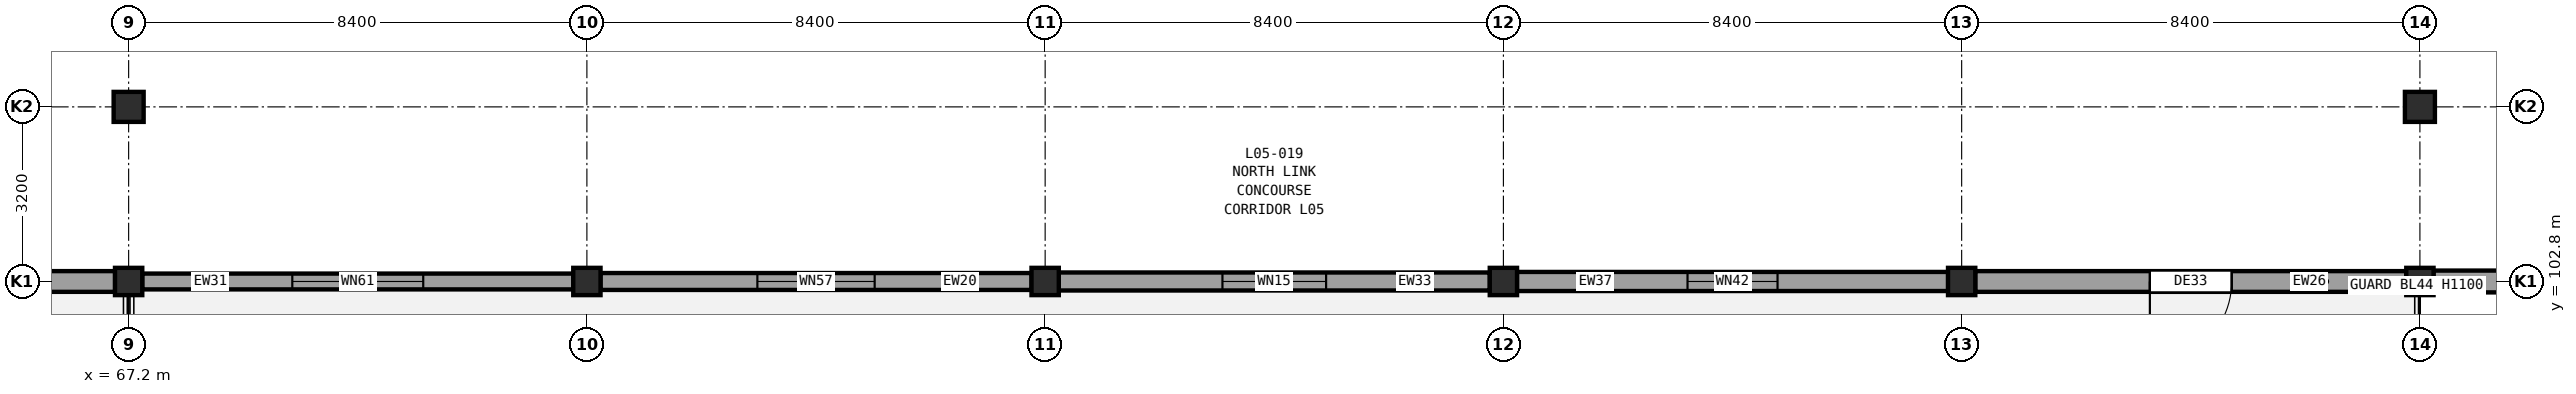
"""IFC4 building model, lengths in metres.
Left out: names, types, materials, properties, quantities, classifications, styles, units other than length and angle.
Written with IfcOpenShell. Run it as: python <this file> out.ifc"""

import sys

from ifc_helpers import new_model, si_unit, direction, frame, frame_2d, origin, origin_2d, place, context, subcontext, project, spatial, rectangle, extrude, element, fill, save


model = new_model("IFC4")
c1 = context("Model", 3, precision=1e-05, world=origin(), true_north=direction((0.0, 1.0)))
c2 = subcontext(c1, "Body", "Model", "MODEL_VIEW")
j1 = project(units=[si_unit("LENGTHUNIT", "METRE"), si_unit("PLANEANGLEUNIT", "RADIAN")], contexts=[c1])
p1 = place(None, origin())
s1 = spatial("IfcSite", under=j1, at=p1, CompositionType="ELEMENT")
p2 = place(p1, origin())
s2 = spatial("IfcBuilding", under=s1, at=p2, CompositionType="ELEMENT")
p3 = place(p2, frame((0.0, 0.0, 24.6)))
s3 = spatial("IfcBuildingStorey", under=s2, at=p3, CompositionType="ELEMENT", Elevation=24.6)
p4 = place(p3, frame((67.2, 102.8, 0.0), z_axis=(0.0, 0.0, 1.0), x_axis=(1.0, 0.0, 0.0)))
e1 = element("IfcColumn", 1, at=p4, inside=s3, PredefinedType="COLUMN", context=c2, shape_type="SweptSolid", body=[
    extrude(rectangle(XDim=0.5, YDim=0.5, at=origin_2d()), origin(), (0.0, 0.0, 1.0), 4.2),
])
p5 = place(p3, frame((67.2, 106.0, 0.0), z_axis=(0.0, 0.0, 1.0), x_axis=(1.0, 0.0, 0.0)))
e2 = element("IfcColumn", 2, at=p5, inside=s3, PredefinedType="COLUMN", context=c2, shape_type="SweptSolid", body=[
    extrude(rectangle(XDim=0.55, YDim=0.55, at=origin_2d()), origin(), (0.0, 0.0, 1.0), 4.2),
])
for number, where, z_axis, x_axis in (
    (3, (75.6, 102.8, 0.0), (0.0, 0.0, 1.0), (1.0, 0.0, 0.0)),
    (4, (84.0, 102.8, 0.0), (0.0, 0.0, 1.0), (1.0, 0.0, 0.0)),
    (5, (92.4, 102.8, 0.0), (0.0, 0.0, 1.0), (1.0, 0.0, 0.0)),
    (6, (100.8, 102.8, 0.0), (0.0, 0.0, 1.0), (1.0, 0.0, 0.0)),
    (7, (109.2, 102.8, 0.0), (0.0, 0.0, 1.0), (1.0, 0.0, 0.0)),
):
    element("IfcColumn", number, at=place(p3, frame(where, z_axis=z_axis, x_axis=x_axis)), inside=s3, PredefinedType="COLUMN", context=c2, shape_type="SweptSolid", body=[
        extrude(rectangle(XDim=0.5, YDim=0.5, at=origin_2d()), origin(), (0.0, 0.0, 1.0), 4.2),
    ])
p6 = place(p3, frame((109.2, 106.0, 0.0), z_axis=(0.0, 0.0, 1.0), x_axis=(1.0, 0.0, 0.0)))
e8 = element("IfcColumn", 8, at=p6, inside=s3, PredefinedType="COLUMN", context=c2, shape_type="SweptSolid", body=[
    extrude(rectangle(XDim=0.55, YDim=0.55, at=origin_2d()), origin(), (0.0, 0.0, 1.0), 4.2),
])
p7 = place(p3, frame((117.352, 102.8, 0.0), z_axis=(0.0, 0.0, 1.0), x_axis=(-1.0, 0.0, 0.0)))
e9 = element("IfcWall", 9, at=p7, inside=s3, PredefinedType="SOLIDWALL", context=c2, shape_type="SweptSolid", body=[
    extrude(rectangle(XDim=7.904, YDim=0.4, at=frame_2d((3.952, 0.0))), origin(), (0.0, 0.0, 1.0), 3.48),
])
p8 = place(p7, frame((2.019, 0.0, 0.9)))
e10 = element("IfcOpeningElement", 10, at=p8, cuts=e9, PredefinedType="OPENING", context=c2, shape_type="SweptSolid", body=[
    extrude(rectangle(XDim=1.4, YDim=2.15, at=frame_2d((0.7, 1.075))), frame((0.0, 0.21, 0.0), z_axis=(0.0, -1.0, 0.0), x_axis=(1.0, 0.0, 0.0)), (0.0, 0.0, 1.0), 0.42),
])
p9 = place(p3, frame((108.952, 102.8, 0.0), z_axis=(0.0, 0.0, 1.0), x_axis=(-1.0, 0.0, 0.0)))
e11 = element("IfcWall", 11, at=p9, inside=s3, PredefinedType="SOLIDWALL", context=c2, shape_type="SweptSolid", body=[
    extrude(rectangle(XDim=7.904, YDim=0.38, at=frame_2d((3.952, 0.0))), origin(), (0.0, 0.0, 1.0), 3.48),
])
p10 = place(p9, frame((3.202, 0.0, 0.0)))
e12 = element("IfcOpeningElement", 12, at=p10, cuts=e11, PredefinedType="OPENING", context=c2, shape_type="SweptSolid", body=[
    extrude(rectangle(XDim=1.5, YDim=2.2, at=frame_2d((0.75, 1.1))), frame((0.0, 0.2, 0.0), z_axis=(0.0, -1.0, 0.0), x_axis=(1.0, 0.0, 0.0)), (0.0, 0.0, 1.0), 0.4),
])
p11 = place(p3, frame((100.552, 102.8, 0.0), z_axis=(0.0, 0.0, 1.0), x_axis=(-1.0, 0.0, 0.0)))
e13 = element("IfcWall", 13, at=p11, inside=s3, PredefinedType="SOLIDWALL", context=c2, shape_type="SweptSolid", body=[
    extrude(rectangle(XDim=7.904, YDim=0.35, at=frame_2d((3.952, 0.0))), origin(), (0.0, 0.0, 1.0), 3.48),
])
p12 = place(p11, frame((3.127, 0.0, 0.9)))
e14 = element("IfcOpeningElement", 14, at=p12, cuts=e13, PredefinedType="OPENING", context=c2, shape_type="SweptSolid", body=[
    extrude(rectangle(XDim=1.65, YDim=2.15, at=frame_2d((0.825, 1.075))), frame((0.0, 0.185, 0.0), z_axis=(0.0, -1.0, 0.0), x_axis=(1.0, 0.0, 0.0)), (0.0, 0.0, 1.0), 0.37),
])
p13 = place(p3, frame((92.152, 102.8, 0.0), z_axis=(0.0, 0.0, 1.0), x_axis=(-1.0, 0.0, 0.0)))
e15 = element("IfcWall", 15, at=p13, inside=s3, PredefinedType="SOLIDWALL", context=c2, shape_type="SweptSolid", body=[
    extrude(rectangle(XDim=7.904, YDim=0.33, at=frame_2d((3.952, 0.0))), origin(), (0.0, 0.0, 1.0), 3.48),
])
p14 = place(p13, frame((3.002, 0.0, 0.9)))
e16 = element("IfcOpeningElement", 16, at=p14, cuts=e15, PredefinedType="OPENING", context=c2, shape_type="SweptSolid", body=[
    extrude(rectangle(XDim=1.9, YDim=2.15, at=frame_2d((0.95, 1.075))), frame((0.0, 0.175, 0.0), z_axis=(0.0, -1.0, 0.0), x_axis=(1.0, 0.0, 0.0)), (0.0, 0.0, 1.0), 0.35),
])
p15 = place(p3, frame((83.752, 102.8, 0.0), z_axis=(0.0, 0.0, 1.0), x_axis=(-1.0, 0.0, 0.0)))
e17 = element("IfcWall", 17, at=p15, inside=s3, PredefinedType="SOLIDWALL", context=c2, shape_type="SweptSolid", body=[
    extrude(rectangle(XDim=7.904, YDim=0.31, at=frame_2d((3.952, 0.0))), origin(), (0.0, 0.0, 1.0), 3.48),
])
p16 = place(p15, frame((2.877, 0.0, 0.9)))
e18 = element("IfcOpeningElement", 18, at=p16, cuts=e17, PredefinedType="OPENING", context=c2, shape_type="SweptSolid", body=[
    extrude(rectangle(XDim=2.15, YDim=2.15, at=frame_2d((1.075, 1.075))), frame((0.0, 0.165, 0.0), z_axis=(0.0, -1.0, 0.0), x_axis=(1.0, 0.0, 0.0)), (0.0, 0.0, 1.0), 0.33),
])
p17 = place(p3, frame((75.352, 102.8, 0.0), z_axis=(0.0, 0.0, 1.0), x_axis=(-1.0, 0.0, 0.0)))
e19 = element("IfcWall", 19, at=p17, inside=s3, PredefinedType="SOLIDWALL", context=c2, shape_type="SweptSolid", body=[
    extrude(rectangle(XDim=7.904, YDim=0.29, at=frame_2d((3.952, 0.0))), origin(), (0.0, 0.0, 1.0), 3.48),
])
p18 = place(p17, frame((2.752, 0.0, 0.9)))
e20 = element("IfcOpeningElement", 20, at=p18, cuts=e19, PredefinedType="OPENING", context=c2, shape_type="SweptSolid", body=[
    extrude(rectangle(XDim=2.4, YDim=2.15, at=frame_2d((1.2, 1.075))), frame((0.0, 0.155, 0.0), z_axis=(0.0, -1.0, 0.0), x_axis=(1.0, 0.0, 0.0)), (0.0, 0.0, 1.0), 0.31),
])
p19 = place(p3, frame((66.952, 102.8, 0.0), z_axis=(0.0, 0.0, 1.0), x_axis=(-1.0, 0.0, 0.0)))
e21 = element("IfcWall", 21, at=p19, inside=s3, PredefinedType="SOLIDWALL", context=c2, shape_type="SweptSolid", body=[
    extrude(rectangle(XDim=7.904, YDim=0.38, at=frame_2d((3.952, 0.0))), origin(), (0.0, 0.0, 1.0), 3.48),
])
p20 = place(p10, origin())
e22 = element("IfcDoor", 22, at=p20, inside=s3, OperationType="SINGLE_SWING_RIGHT", PredefinedType="DOOR", context=c2, shape_type="SweptSolid", body=[
    extrude(rectangle(XDim=1.5, YDim=2.2, at=frame_2d((0.75, 1.1))), frame((0.0, 0.025, 0.0), z_axis=(0.0, -1.0, 0.0), x_axis=(1.0, 0.0, 0.0)), (0.0, 0.0, 1.0), 0.05),
])
fill(e12, e22)
p21 = place(p12, origin())
e23 = element("IfcWindow", 23, at=p21, inside=s3, PartitioningType="DOUBLE_PANEL_VERTICAL", PredefinedType="WINDOW", context=c2, shape_type="SweptSolid", body=[
    extrude(rectangle(XDim=1.65, YDim=2.15, at=frame_2d((0.825, 1.075))), frame((0.0, 0.03, 0.0), z_axis=(0.0, -1.0, 0.0), x_axis=(1.0, 0.0, 0.0)), (0.0, 0.0, 1.0), 0.06),
])
fill(e14, e23)
p22 = place(p14, origin())
e24 = element("IfcWindow", 24, at=p22, inside=s3, PartitioningType="DOUBLE_PANEL_VERTICAL", PredefinedType="WINDOW", context=c2, shape_type="SweptSolid", body=[
    extrude(rectangle(XDim=1.9, YDim=2.15, at=frame_2d((0.95, 1.075))), frame((0.0, 0.03, 0.0), z_axis=(0.0, -1.0, 0.0), x_axis=(1.0, 0.0, 0.0)), (0.0, 0.0, 1.0), 0.06),
])
fill(e16, e24)
p23 = place(p16, origin())
e25 = element("IfcWindow", 25, at=p23, inside=s3, PartitioningType="DOUBLE_PANEL_VERTICAL", PredefinedType="WINDOW", context=c2, shape_type="SweptSolid", body=[
    extrude(rectangle(XDim=2.15, YDim=2.15, at=frame_2d((1.075, 1.075))), frame((0.0, 0.03, 0.0), z_axis=(0.0, -1.0, 0.0), x_axis=(1.0, 0.0, 0.0)), (0.0, 0.0, 1.0), 0.06),
])
fill(e18, e25)
p24 = place(p18, origin())
e26 = element("IfcWindow", 26, at=p24, inside=s3, PartitioningType="DOUBLE_PANEL_VERTICAL", PredefinedType="WINDOW", context=c2, shape_type="SweptSolid", body=[
    extrude(rectangle(XDim=2.4, YDim=2.15, at=frame_2d((1.2, 1.075))), frame((0.0, 0.03, 0.0), z_axis=(0.0, -1.0, 0.0), x_axis=(1.0, 0.0, 0.0)), (0.0, 0.0, 1.0), 0.06),
])
fill(e20, e26)
save(model, sys.argv[1])
